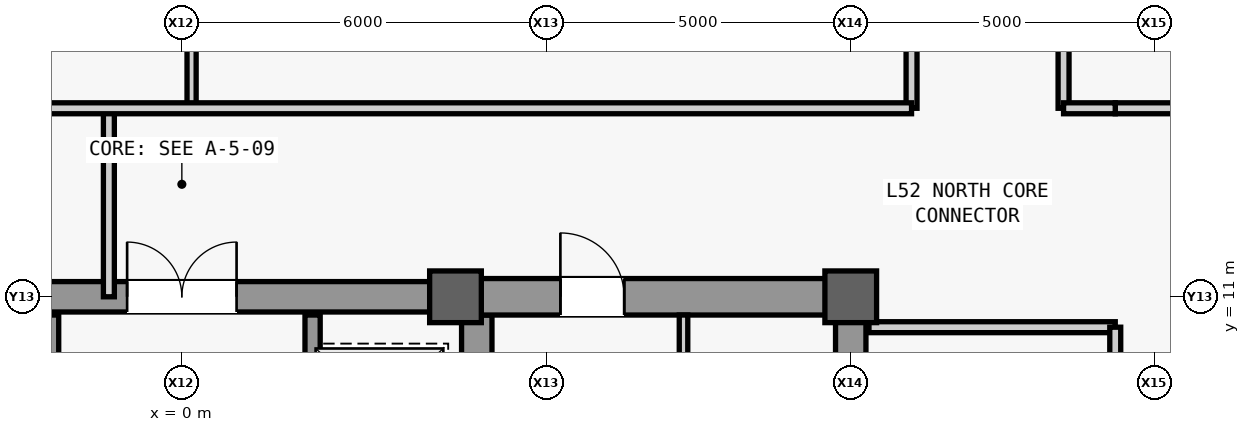
"""IFC4 building model, lengths in metres.
Left out: names, types, materials, properties, quantities, classifications, styles, units other than length and angle.
Written with IfcOpenShell. Run it as: python <this file> out.ifc"""

import sys

from ifc_helpers import new_model, si_unit, direction, frame, frame_2d, origin, origin_2d, place, context, subcontext, project, spatial, rectangle, extrude, source, transform, mapped, element, fill, save


model = new_model("IFC4")
c1 = context("Model", 3, precision=1e-05, world=origin(), true_north=direction((0.0, 1.0)))
c2 = subcontext(c1, "Body", "Model", "MODEL_VIEW")
j1 = project(units=[si_unit("LENGTHUNIT", "METRE"), si_unit("PLANEANGLEUNIT", "RADIAN")], contexts=[c1])
p1 = place(None, origin())
s1 = spatial("IfcSite", under=j1, at=p1, CompositionType="ELEMENT")
p2 = place(p1, origin())
s2 = spatial("IfcBuilding", under=s1, at=p2, CompositionType="ELEMENT")
p3 = place(p2, frame((0.0, 0.0, 223.1)))
s3 = spatial("IfcBuildingStorey", under=s2, at=p3, CompositionType="ELEMENT", Elevation=223.1)
m1 = source(origin(), c2, "Body", "SweptSolid", [
    extrude(rectangle(XDim=22.0, YDim=0.5, at=frame_2d((11.0, 0.0))), origin(), (0.0, 0.0, 1.0), 3.78),
])
p4 = place(p3, frame((11.0, -11.0, 0.0), z_axis=(0.0, 0.0, 1.0), x_axis=(0.0, 1.0, 0.0)))
e1 = element("IfcWall", 1, at=p4, inside=s3, PredefinedType="SHEAR", context=c2, shape_type="MappedRepresentation", body=[
    mapped(m1, transform((0.0, 0.0, 0.0), scale=1.0)),
])
m2 = source(origin(), c2, "Body", "SweptSolid", [
    extrude(rectangle(XDim=1.1, YDim=2.2, at=frame_2d((0.55, 1.1))), frame((0.0, 0.26, 0.0), z_axis=(0.0, -1.0, 0.0), x_axis=(1.0, 0.0, 0.0)), (0.0, 0.0, 1.0), 0.52),
])
p5 = place(p4, frame((0.8, 0.0, 0.0)))
e2 = element("IfcOpeningElement", 2, at=p5, cuts=e1, PredefinedType="OPENING", context=c2, shape_type="MappedRepresentation", body=[
    mapped(m2, transform((0.0, 0.0, 0.0), scale=1.0)),
])
m3 = source(origin(), c2, "Body", "SweptSolid", [
    extrude(rectangle(XDim=0.9, YDim=2.15, at=frame_2d((0.45, 1.075))), frame((0.0, 0.26, 0.0), z_axis=(0.0, -1.0, 0.0), x_axis=(1.0, 0.0, 0.0)), (0.0, 0.0, 1.0), 0.52),
])
p6 = place(p4, frame((6.85, 0.0, 0.0)))
e3 = element("IfcOpeningElement", 3, at=p6, cuts=e1, PredefinedType="OPENING", context=c2, shape_type="MappedRepresentation", body=[
    mapped(m3, transform((0.0, 0.0, 0.0), scale=1.0)),
])
m4 = source(origin(), c2, "Body", "SweptSolid", [
    extrude(rectangle(XDim=1.3, YDim=2.3, at=frame_2d((0.65, 1.15))), frame((0.0, 0.26, 0.0), z_axis=(0.0, -1.0, 0.0), x_axis=(1.0, 0.0, 0.0)), (0.0, 0.0, 1.0), 0.52),
])
p7 = place(p4, frame((2.7, 0.0, 0.0)))
e4 = element("IfcOpeningElement", 4, at=p7, cuts=e1, PredefinedType="OPENING", context=c2, shape_type="MappedRepresentation", body=[
    mapped(m4, transform((0.0, 0.0, 0.0), scale=1.0)),
])
p8 = place(p4, frame((13.35, 0.0, 0.0)))
e5 = element("IfcOpeningElement", 5, at=p8, cuts=e1, PredefinedType="OPENING", context=c2, shape_type="MappedRepresentation", body=[
    mapped(m4, transform((0.0, 0.0, 0.0), scale=1.0)),
])
m5 = source(origin(), c2, "Body", "SweptSolid", [
    extrude(rectangle(XDim=21.4, YDim=0.5, at=frame_2d((10.7, 0.0))), origin(), (0.0, 0.0, 1.0), 3.78),
])
p9 = place(p3, frame((4.85, -10.7, 0.0), z_axis=(0.0, 0.0, 1.0), x_axis=(0.0, 1.0, 0.0)))
e6 = element("IfcWall", 6, at=p9, inside=s3, PredefinedType="SHEAR", context=c2, shape_type="MappedRepresentation", body=[
    mapped(m5, transform((0.0, 0.0, 0.0), scale=1.0)),
])
m6 = source(origin(), c2, "Body", "SweptSolid", [
    extrude(rectangle(XDim=5.9, YDim=0.6, at=frame_2d((2.95, 0.0))), origin(), (0.0, 0.0, 1.0), 3.78),
])
p10 = place(p3, frame((4.85, 11.0, 0.0), z_axis=(0.0, 0.0, 1.0), x_axis=(1.0, 0.0, 0.0)))
e7 = element("IfcWall", 7, at=p10, inside=s3, PredefinedType="SHEAR", context=c2, shape_type="MappedRepresentation", body=[
    mapped(m6, transform((0.0, 0.0, 0.0), scale=1.0)),
])
m7 = source(origin(), c2, "Body", "SweptSolid", [
    extrude(rectangle(XDim=1.05, YDim=2.2, at=frame_2d((0.525, 1.1))), frame((0.0, 0.31, 0.0), z_axis=(0.0, -1.0, 0.0), x_axis=(1.0, 0.0, 0.0)), (0.0, 0.0, 1.0), 0.62),
])
p11 = place(p10, frame((1.375, 0.0, 0.0)))
e8 = element("IfcOpeningElement", 8, at=p11, cuts=e7, PredefinedType="OPENING", context=c2, shape_type="MappedRepresentation", body=[
    mapped(m7, transform((0.0, 0.0, 0.0), scale=1.0)),
])
m8 = source(origin(), c2, "Body", "SweptSolid", [
    extrude(rectangle(XDim=9.2, YDim=0.5, at=frame_2d((4.6, 0.0))), origin(), (0.0, 0.0, 1.0), 3.78),
])
p12 = place(p3, frame((-4.6, 11.0, 0.0), z_axis=(0.0, 0.0, 1.0), x_axis=(1.0, 0.0, 0.0)))
e9 = element("IfcWall", 9, at=p12, inside=s3, PredefinedType="SHEAR", context=c2, shape_type="MappedRepresentation", body=[
    mapped(m8, transform((0.0, 0.0, 0.0), scale=1.0)),
])
m9 = source(origin(), c2, "Body", "SweptSolid", [
    extrude(rectangle(XDim=1.8, YDim=2.25, at=frame_2d((0.9, 1.125))), frame((0.0, 0.26, 0.0), z_axis=(0.0, -1.0, 0.0), x_axis=(1.0, 0.0, 0.0)), (0.0, 0.0, 1.0), 0.52),
])
p13 = place(p12, frame((3.7, 0.0, 0.0)))
e10 = element("IfcOpeningElement", 10, at=p13, cuts=e9, PredefinedType="OPENING", context=c2, shape_type="MappedRepresentation", body=[
    mapped(m9, transform((0.0, 0.0, 0.0), scale=1.0)),
])
m10 = source(origin(), c2, "Body", "SweptSolid", [
    extrude(rectangle(XDim=0.85, YDim=0.85, at=origin_2d()), origin(), (0.0, 0.0, 1.0), 4.0),
])
for number, where, z_axis, x_axis in (
    (11, (4.5, 11.0, 0.0), (0.0, 0.0, 1.0), (1.0, 0.0, 0.0)),
    (12, (11.0, 11.0, 0.0), (0.0, 0.0, 1.0), (1.0, 0.0, 0.0)),
):
    element("IfcColumn", number, at=place(p3, frame(where, z_axis=z_axis, x_axis=x_axis)), inside=s3, PredefinedType="COLUMN", context=c2, shape_type="MappedRepresentation", body=[
        mapped(m10, transform((0.0, 0.0, 0.0), scale=1.0)),
    ])
m11 = source(origin(), c2, "Body", "SweptSolid", [
    extrude(rectangle(XDim=9.4, YDim=0.14, at=frame_2d((4.7, 0.0))), origin(), (0.0, 0.0, 1.0), 3.78),
])
p14 = place(p3, frame((8.25, 1.3, 0.0), z_axis=(0.0, 0.0, 1.0), x_axis=(0.0, 1.0, 0.0)))
e13 = element("IfcWall", 13, at=p14, inside=s3, PredefinedType="PARTITIONING", context=c2, shape_type="MappedRepresentation", body=[
    mapped(m11, transform((0.0, 0.0, 0.0), scale=1.0)),
])
m12 = source(origin(), c2, "Body", "SweptSolid", [
    extrude(rectangle(XDim=4.05, YDim=0.18, at=frame_2d((2.025, 0.0))), origin(), (0.0, 0.0, 1.0), 3.78),
])
p15 = place(p3, frame((11.3, 10.5, 0.0), z_axis=(0.0, 0.0, 1.0), x_axis=(1.0, 0.0, 0.0)))
e14 = element("IfcWall", 14, at=p15, inside=s3, PredefinedType="PARTITIONING", context=c2, shape_type="MappedRepresentation", body=[
    mapped(m12, transform((0.0, 0.0, 0.0), scale=1.0)),
])
m13 = source(origin(), c2, "Body", "SweptSolid", [
    extrude(rectangle(XDim=16.6, YDim=0.18, at=frame_2d((8.3, 0.0))), origin(), (0.0, 0.0, 1.0), 3.78),
])
p16 = place(p3, frame((15.35, -6.1, 0.0), z_axis=(0.0, 0.0, 1.0), x_axis=(0.0, 1.0, 0.0)))
e15 = element("IfcWall", 15, at=p16, inside=s3, PredefinedType="PARTITIONING", context=c2, shape_type="MappedRepresentation", body=[
    mapped(m13, transform((0.0, 0.0, 0.0), scale=1.0)),
])
m14 = source(origin(), c2, "Body", "SweptSolid", [
    extrude(rectangle(XDim=1.8, YDim=2.25, at=frame_2d((0.9, 1.125))), frame((0.0, 0.1, 0.0), z_axis=(0.0, -1.0, 0.0), x_axis=(1.0, 0.0, 0.0)), (0.0, 0.0, 1.0), 0.2),
])
p17 = place(p16, frame((2.7, 0.0, 0.0)))
e16 = element("IfcOpeningElement", 16, at=p17, cuts=e15, PredefinedType="OPENING", context=c2, shape_type="MappedRepresentation", body=[
    mapped(m14, transform((0.0, 0.0, 0.0), scale=1.0)),
])
p18 = place(p16, frame((13.0, 0.0, 0.0)))
e17 = element("IfcOpeningElement", 17, at=p18, cuts=e15, PredefinedType="OPENING", context=c2, shape_type="MappedRepresentation", body=[
    mapped(m14, transform((0.0, 0.0, 0.0), scale=1.0)),
])
m15 = source(origin(), c2, "Body", "SweptSolid", [
    extrude(rectangle(XDim=5.4, YDim=0.25, at=frame_2d((2.7, 0.0))), origin(), (0.0, 0.0, 1.0), 3.78),
])
p19 = place(p3, frame((-2.15, 5.3, 0.0), z_axis=(0.0, 0.0, 1.0), x_axis=(0.0, 1.0, 0.0)))
e18 = element("IfcWall", 18, at=p19, inside=s3, PredefinedType="SHEAR", context=c2, shape_type="MappedRepresentation", body=[
    mapped(m15, transform((0.0, 0.0, 0.0), scale=1.0)),
])
m16 = source(origin(), c2, "Body", "SweptSolid", [
    extrude(rectangle(XDim=1.2, YDim=2.3, at=frame_2d((0.6, 1.15))), frame((0.0, 0.135, 0.0), z_axis=(0.0, -1.0, 0.0), x_axis=(1.0, 0.0, 0.0)), (0.0, 0.0, 1.0), 0.27),
])
p20 = place(p19, frame((3.3, 0.0, 0.0)))
e19 = element("IfcOpeningElement", 19, at=p20, cuts=e18, PredefinedType="OPENING", context=c2, shape_type="MappedRepresentation", body=[
    mapped(m16, transform((0.0, 0.0, 0.0), scale=1.0)),
])
p21 = place(p19, frame((0.9, 0.0, 0.0)))
e20 = element("IfcOpeningElement", 20, at=p21, cuts=e18, PredefinedType="OPENING", context=c2, shape_type="MappedRepresentation", body=[
    mapped(m16, transform((0.0, 0.0, 0.0), scale=1.0)),
])
p22 = place(p3, frame((2.15, 5.3, 0.0), z_axis=(0.0, 0.0, 1.0), x_axis=(0.0, 1.0, 0.0)))
e21 = element("IfcWall", 21, at=p22, inside=s3, PredefinedType="SHEAR", context=c2, shape_type="MappedRepresentation", body=[
    mapped(m15, transform((0.0, 0.0, 0.0), scale=1.0)),
])
p23 = place(p22, frame((3.3, 0.0, 0.0)))
e22 = element("IfcOpeningElement", 22, at=p23, cuts=e21, PredefinedType="OPENING", context=c2, shape_type="MappedRepresentation", body=[
    mapped(m16, transform((0.0, 0.0, 0.0), scale=1.0)),
])
p24 = place(p22, frame((0.9, 0.0, 0.0)))
e23 = element("IfcOpeningElement", 23, at=p24, cuts=e21, PredefinedType="OPENING", context=c2, shape_type="MappedRepresentation", body=[
    mapped(m16, transform((0.0, 0.0, 0.0), scale=1.0)),
])
m17 = source(origin(), c2, "Body", "SweptSolid", [
    extrude(rectangle(XDim=2.45, YDim=0.18, at=frame_2d((1.225, 0.0))), origin(), (0.0, 0.0, 1.0), 3.78),
])
p25 = place(p3, frame((15.35, 14.1, 0.0), z_axis=(0.0, 0.0, 1.0), x_axis=(1.0, 0.0, 0.0)))
e24 = element("IfcWall", 24, at=p25, inside=s3, PredefinedType="PARTITIONING", context=c2, shape_type="MappedRepresentation", body=[
    mapped(m17, transform((0.0, 0.0, 0.0), scale=1.0)),
])
m18 = source(origin(), c2, "Body", "SweptSolid", [
    extrude(rectangle(XDim=3.1, YDim=0.18, at=frame_2d((1.55, 0.0))), origin(), (0.0, 0.0, 1.0), 3.78),
])
p26 = place(p3, frame((-1.2, 11.0, 0.0), z_axis=(0.0, 0.0, 1.0), x_axis=(0.0, 1.0, 0.0)))
e25 = element("IfcWall", 25, at=p26, inside=s3, PredefinedType="PARTITIONING", context=c2, shape_type="MappedRepresentation", body=[
    mapped(m18, transform((0.0, 0.0, 0.0), scale=1.0)),
])
m19 = source(origin(), c2, "Body", "SweptSolid", [
    extrude(rectangle(XDim=15.9, YDim=0.15, at=frame_2d((7.95, 0.0))), origin(), (0.0, 0.0, 1.0), 3.085),
])
p27 = place(p3, frame((0.16, 14.1, 0.0), z_axis=(0.0, 0.0, 1.0), x_axis=(0.0, 1.0, 0.0)))
e26 = element("IfcWall", 26, at=p27, inside=s3, PredefinedType="PARTITIONING", context=c2, shape_type="MappedRepresentation", body=[
    mapped(m19, transform((0.0, 0.0, 0.0), scale=1.0)),
])
m20 = source(origin(), c2, "Body", "SweptSolid", [
    extrude(rectangle(XDim=0.95, YDim=2.15, at=frame_2d((0.475, 1.075))), frame((0.0, 0.085, 0.0), z_axis=(0.0, -1.0, 0.0), x_axis=(1.0, 0.0, 0.0)), (0.0, 0.0, 1.0), 0.17),
])
p28 = place(p27, frame((11.45, 0.0, 0.0)))
e27 = element("IfcOpeningElement", 27, at=p28, cuts=e26, PredefinedType="OPENING", context=c2, shape_type="MappedRepresentation", body=[
    mapped(m20, transform((0.0, 0.0, 0.0), scale=1.0)),
])
m21 = source(origin(), c2, "Body", "SweptSolid", [
    extrude(rectangle(XDim=15.9, YDim=0.18, at=frame_2d((7.95, 0.0))), origin(), (0.0, 0.0, 1.0), 3.78),
])
p29 = place(p3, frame((12.0, 14.1, 0.0), z_axis=(0.0, 0.0, 1.0), x_axis=(0.0, 1.0, 0.0)))
e28 = element("IfcWall", 28, at=p29, inside=s3, PredefinedType="PARTITIONING", context=c2, shape_type="MappedRepresentation", body=[
    mapped(m21, transform((0.0, 0.0, 0.0), scale=1.0)),
])
m22 = source(origin(), c2, "Body", "SweptSolid", [
    extrude(rectangle(XDim=1.05, YDim=2.2, at=frame_2d((0.525, 1.1))), frame((0.0, 0.1, 0.0), z_axis=(0.0, -1.0, 0.0), x_axis=(1.0, 0.0, 0.0)), (0.0, 0.0, 1.0), 0.2),
])
p30 = place(p29, frame((11.4, 0.0, 0.0)))
e29 = element("IfcOpeningElement", 29, at=p30, cuts=e28, PredefinedType="OPENING", context=c2, shape_type="MappedRepresentation", body=[
    mapped(m22, transform((0.0, 0.0, 0.0), scale=1.0)),
])
m23 = source(origin(), c2, "Body", "SweptSolid", [
    extrude(rectangle(XDim=27.35, YDim=0.18, at=frame_2d((13.675, 0.0))), origin(), (0.0, 0.0, 1.0), 3.78),
])
p31 = place(p3, frame((-15.35, 14.1, 0.0), z_axis=(0.0, 0.0, 1.0), x_axis=(1.0, 0.0, 0.0)))
e30 = element("IfcWall", 30, at=p31, inside=s3, PredefinedType="PARTITIONING", context=c2, shape_type="MappedRepresentation", body=[
    mapped(m23, transform((0.0, 0.0, 0.0), scale=1.0)),
])
p32 = place(p3, frame((14.5, 14.1, 0.0), z_axis=(0.0, 0.0, 1.0), x_axis=(0.0, 1.0, 0.0)))
e31 = element("IfcWall", 31, at=p32, inside=s3, PredefinedType="PARTITIONING", context=c2, shape_type="MappedRepresentation", body=[
    mapped(m21, transform((0.0, 0.0, 0.0), scale=1.0)),
])
p33 = place(p32, frame((11.4, 0.0, 0.0)))
e32 = element("IfcOpeningElement", 32, at=p33, cuts=e31, PredefinedType="OPENING", context=c2, shape_type="MappedRepresentation", body=[
    mapped(m22, transform((0.0, 0.0, 0.0), scale=1.0)),
])
m24 = source(origin(), c2, "Body", "SweptSolid", [
    extrude(rectangle(XDim=0.85, YDim=0.18, at=frame_2d((0.425, 0.0))), origin(), (0.0, 0.0, 1.0), 3.78),
])
p34 = place(p3, frame((14.5, 14.1, 0.0), z_axis=(0.0, 0.0, 1.0), x_axis=(1.0, 0.0, 0.0)))
e33 = element("IfcWall", 33, at=p34, inside=s3, PredefinedType="PARTITIONING", context=c2, shape_type="MappedRepresentation", body=[
    mapped(m24, transform((0.0, 0.0, 0.0), scale=1.0)),
])
m25 = source(origin(), c2, "Body", "SweptSolid", [
    extrude(rectangle(XDim=1.05, YDim=2.2, at=frame_2d((0.525, 1.1))), frame((0.0, 0.025, 0.0), z_axis=(0.0, -1.0, 0.0), x_axis=(1.0, 0.0, 0.0)), (0.0, 0.0, 1.0), 0.05),
])
p35 = place(p11, origin())
e34 = element("IfcDoor", 34, at=p35, inside=s3, OperationType="SINGLE_SWING_LEFT", PredefinedType="DOOR", context=c2, shape_type="MappedRepresentation", body=[
    mapped(m25, transform((0.0, 0.0, 0.0), scale=1.0)),
])
fill(e8, e34)
m26 = source(origin(), c2, "Body", "SweptSolid", [
    extrude(rectangle(XDim=1.8, YDim=2.25, at=frame_2d((0.9, 1.125))), frame((0.0, 0.025, 0.0), z_axis=(0.0, -1.0, 0.0), x_axis=(1.0, 0.0, 0.0)), (0.0, 0.0, 1.0), 0.05),
])
p36 = place(p13, origin())
e35 = element("IfcDoor", 35, at=p36, inside=s3, OperationType="SINGLE_SWING_RIGHT", PredefinedType="DOOR", context=c2, shape_type="MappedRepresentation", body=[
    mapped(m26, transform((0.0, 0.0, 0.0), scale=1.0)),
])
fill(e10, e35)
save(model, sys.argv[1])
